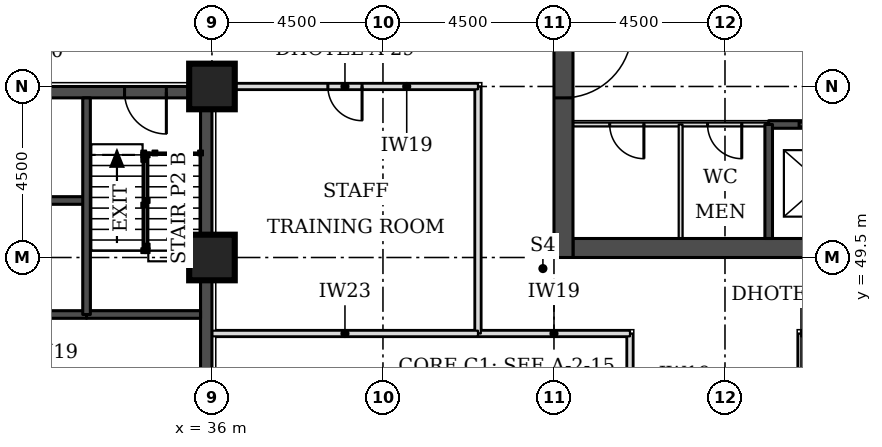
"""IFC4 building model, lengths in metres.
Left out: names, types, materials, properties, quantities, classifications, styles, units other than length and angle.
Written with IfcOpenShell. Run it as: python <this file> out.ifc"""

import sys

from ifc_helpers import new_model, si_unit, direction, frame, frame_2d, origin, origin_2d, place, context, subcontext, project, spatial, rectangle, extrude, element, fill, save


model = new_model("IFC4")
c1 = context("Model", 3, precision=1e-05, world=origin(), true_north=direction((0.0, 1.0)))
c2 = subcontext(c1, "Body", "Model", "MODEL_VIEW")
j1 = project(units=[si_unit("LENGTHUNIT", "METRE"), si_unit("PLANEANGLEUNIT", "RADIAN")], contexts=[c1])
p1 = place(None, origin())
s1 = spatial("IfcSite", under=j1, at=p1, CompositionType="ELEMENT")
p2 = place(p1, origin())
s2 = spatial("IfcBuilding", under=s1, at=p2, CompositionType="ELEMENT")
p3 = place(p2, frame((0.0, 0.0, 49.5)))
s3 = spatial("IfcBuildingStorey", under=s2, at=p3, CompositionType="ELEMENT", Elevation=49.5)
for number, where, z_axis, x_axis in (
    (1, (36.0, 49.5, 0.0), (0.0, 0.0, 1.0), (1.0, 0.0, 0.0)),
    (2, (36.0, 54.0, 0.0), (0.0, 0.0, 1.0), (1.0, 0.0, 0.0)),
):
    element("IfcColumn", number, at=place(p3, frame(where, z_axis=z_axis, x_axis=x_axis)), inside=s3, PredefinedType="COLUMN", context=c2, shape_type="SweptSolid", body=[
        extrude(rectangle(XDim=1.2, YDim=1.2, at=origin_2d()), origin(), (0.0, 0.0, 1.0), 3.3),
    ])
p4 = place(p3, frame((45.5, 49.75, 0.0), z_axis=(0.0, 0.0, 1.0), x_axis=(1.0, 0.0, 0.0)))
e3 = element("IfcWall", 3, at=p4, inside=s3, PredefinedType="SHEAR", context=c2, shape_type="SweptSolid", body=[
    extrude(rectangle(XDim=21.5, YDim=0.5, at=frame_2d((10.75, 0.0))), origin(), (0.0, 0.0, 1.0), 3.3),
])
p5 = place(p3, frame((45.25, 49.5, 0.0), z_axis=(0.0, 0.0, 1.0), x_axis=(0.0, 1.0, 0.0)))
e4 = element("IfcWall", 4, at=p5, inside=s3, PredefinedType="SHEAR", context=c2, shape_type="SweptSolid", body=[
    extrude(rectangle(XDim=22.5, YDim=0.5, at=frame_2d((11.25, 0.0))), origin(), (0.0, 0.0, 1.0), 3.3),
])
p6 = place(p5, frame((4.2, 0.0, 0.0)))
e5 = element("IfcOpeningElement", 5, at=p6, cuts=e4, PredefinedType="OPENING", context=c2, shape_type="SweptSolid", body=[
    extrude(rectangle(XDim=1.8, YDim=2.1, at=frame_2d((0.9, 1.05))), frame((0.0, 0.26, 0.0), z_axis=(0.0, -1.0, 0.0), x_axis=(1.0, 0.0, 0.0)), (0.0, 0.0, 1.0), 0.52),
])
p7 = place(p5, frame((6.9, 0.0, 0.0)))
e6 = element("IfcOpeningElement", 6, at=p7, cuts=e4, PredefinedType="OPENING", context=c2, shape_type="SweptSolid", body=[
    extrude(rectangle(XDim=1.1, YDim=2.1, at=frame_2d((0.55, 1.05))), frame((0.0, 0.26, 0.0), z_axis=(0.0, -1.0, 0.0), x_axis=(1.0, 0.0, 0.0)), (0.0, 0.0, 1.0), 0.52),
])
p8 = place(p5, frame((13.6, 0.0, 0.0)))
e7 = element("IfcOpeningElement", 7, at=p8, cuts=e4, PredefinedType="OPENING", context=c2, shape_type="SweptSolid", body=[
    extrude(rectangle(XDim=1.1, YDim=2.1, at=frame_2d((0.55, 1.05))), frame((0.0, 0.26, 0.0), z_axis=(0.0, -1.0, 0.0), x_axis=(1.0, 0.0, 0.0)), (0.0, 0.0, 1.0), 0.52),
])
p9 = place(p5, frame((16.5, 0.0, 0.0)))
e8 = element("IfcOpeningElement", 8, at=p9, cuts=e4, PredefinedType="OPENING", context=c2, shape_type="SweptSolid", body=[
    extrude(rectangle(XDim=1.8, YDim=2.1, at=frame_2d((0.9, 1.05))), frame((0.0, 0.26, 0.0), z_axis=(0.0, -1.0, 0.0), x_axis=(1.0, 0.0, 0.0)), (0.0, 0.0, 1.0), 0.52),
])
p10 = place(p3, frame((27.3, 53.85, 0.0), z_axis=(0.0, 0.0, 1.0), x_axis=(1.0, 0.0, 0.0)))
e9 = element("IfcWall", 9, at=p10, inside=s3, PredefinedType="SHEAR", context=c2, shape_type="SweptSolid", body=[
    extrude(rectangle(XDim=8.4, YDim=0.3, at=frame_2d((4.2, 0.0))), origin(), (0.0, 0.0, 1.0), 3.3),
])
p11 = place(p10, frame((6.4, 0.0, 0.0)))
e10 = element("IfcOpeningElement", 10, at=p11, cuts=e9, PredefinedType="OPENING", context=c2, shape_type="SweptSolid", body=[
    extrude(rectangle(XDim=1.1, YDim=2.1, at=frame_2d((0.55, 1.05))), frame((0.0, 0.16, 0.0), z_axis=(0.0, -1.0, 0.0), x_axis=(1.0, 0.0, 0.0)), (0.0, 0.0, 1.0), 0.32),
])
p12 = place(p3, frame((35.85, 45.0, 0.0), z_axis=(0.0, 0.0, 1.0), x_axis=(0.0, 1.0, 0.0)))
e11 = element("IfcWall", 11, at=p12, inside=s3, PredefinedType="SHEAR", context=c2, shape_type="SweptSolid", body=[
    extrude(rectangle(XDim=9.0, YDim=0.3, at=frame_2d((4.5, 0.0))), origin(), (0.0, 0.0, 1.0), 3.3),
])
p13 = place(p3, frame((51.5, 23.65, 0.0), z_axis=(0.0, 0.0, 1.0), x_axis=(0.0, 1.0, 0.0)))
e12 = element("IfcWall", 12, at=p13, inside=s3, PredefinedType="PARTITIONING", context=c2, shape_type="SweptSolid", body=[
    extrude(rectangle(XDim=23.85, YDim=0.15, at=frame_2d((11.925, 0.0))), origin(), (0.0, 0.0, 1.0), 3.08),
])
p14 = place(p13, frame((4.075, 0.0, 0.0)))
e13 = element("IfcOpeningElement", 13, at=p14, cuts=e12, PredefinedType="OPENING", context=c2, shape_type="SweptSolid", body=[
    extrude(rectangle(XDim=1.0, YDim=2.1, at=frame_2d((0.5, 1.05))), frame((0.0, 0.085, 0.0), z_axis=(0.0, -1.0, 0.0), x_axis=(1.0, 0.0, 0.0)), (0.0, 0.0, 1.0), 0.17),
])
p15 = place(p13, frame((10.375, 0.0, 0.0)))
e14 = element("IfcOpeningElement", 14, at=p15, cuts=e12, PredefinedType="OPENING", context=c2, shape_type="SweptSolid", body=[
    extrude(rectangle(XDim=1.0, YDim=2.1, at=frame_2d((0.5, 1.05))), frame((0.0, 0.085, 0.0), z_axis=(0.0, -1.0, 0.0), x_axis=(1.0, 0.0, 0.0)), (0.0, 0.0, 1.0), 0.17),
])
p16 = place(p13, frame((19.9, 0.0, 0.0)))
e15 = element("IfcOpeningElement", 15, at=p16, cuts=e12, PredefinedType="OPENING", context=c2, shape_type="SweptSolid", body=[
    extrude(rectangle(XDim=0.9, YDim=2.1, at=frame_2d((0.45, 1.05))), frame((0.0, 0.085, 0.0), z_axis=(0.0, -1.0, 0.0), x_axis=(1.0, 0.0, 0.0)), (0.0, 0.0, 1.0), 0.17),
])
p17 = place(p3, frame((47.0, 40.5, 0.0), z_axis=(0.0, 0.0, 1.0), x_axis=(0.0, 1.0, 0.0)))
e16 = element("IfcWall", 16, at=p17, inside=s3, PredefinedType="PARTITIONING", context=c2, shape_type="SweptSolid", body=[
    extrude(rectangle(XDim=7.0, YDim=0.15, at=frame_2d((3.5, 0.0))), origin(), (0.0, 0.0, 1.0), 3.08),
])
p18 = place(p17, frame((3.05, 0.0, 0.0)))
e17 = element("IfcOpeningElement", 17, at=p18, cuts=e16, PredefinedType="OPENING", context=c2, shape_type="SweptSolid", body=[
    extrude(rectangle(XDim=0.9, YDim=2.1, at=frame_2d((0.45, 1.05))), frame((0.0, 0.085, 0.0), z_axis=(0.0, -1.0, 0.0), x_axis=(1.0, 0.0, 0.0)), (0.0, 0.0, 1.0), 0.17),
])
p19 = place(p3, frame((43.0, 47.5, 0.0), z_axis=(0.0, 0.0, 1.0), x_axis=(1.0, 0.0, 0.0)))
e18 = element("IfcWall", 18, at=p19, inside=s3, PredefinedType="PARTITIONING", context=c2, shape_type="SweptSolid", body=[
    extrude(rectangle(XDim=4.0, YDim=0.15, at=frame_2d((2.0, 0.0))), origin(), (0.0, 0.0, 1.0), 3.08),
])
p20 = place(p3, frame((43.0, 47.5, 0.0), z_axis=(0.0, 0.0, 1.0), x_axis=(0.0, 1.0, 0.0)))
e19 = element("IfcWall", 19, at=p20, inside=s3, PredefinedType="PARTITIONING", context=c2, shape_type="SweptSolid", body=[
    extrude(rectangle(XDim=6.5, YDim=0.15, at=frame_2d((3.25, 0.0))), origin(), (0.0, 0.0, 1.0), 3.08),
])
p21 = place(p3, frame((51.5, 47.5, 0.0), z_axis=(0.0, 0.0, 1.0), x_axis=(1.0, 0.0, 0.0)))
e20 = element("IfcWall", 20, at=p21, inside=s3, PredefinedType="PARTITIONING", context=c2, shape_type="SweptSolid", body=[
    extrude(rectangle(XDim=18.0, YDim=0.15, at=frame_2d((9.0, 0.0))), origin(), (0.0, 0.0, 1.0), 3.08),
])
p22 = place(p21, frame((12.075, 0.0, 0.0)))
e21 = element("IfcOpeningElement", 21, at=p22, cuts=e20, PredefinedType="OPENING", context=c2, shape_type="SweptSolid", body=[
    extrude(rectangle(XDim=1.0, YDim=2.1, at=frame_2d((0.5, 1.05))), frame((0.0, 0.085, 0.0), z_axis=(0.0, -1.0, 0.0), x_axis=(1.0, 0.0, 0.0)), (0.0, 0.0, 1.0), 0.17),
])
p23 = place(p21, frame((9.675, 0.0, 0.0)))
e22 = element("IfcOpeningElement", 22, at=p23, cuts=e20, PredefinedType="OPENING", context=c2, shape_type="SweptSolid", body=[
    extrude(rectangle(XDim=1.0, YDim=2.1, at=frame_2d((0.5, 1.05))), frame((0.0, 0.085, 0.0), z_axis=(0.0, -1.0, 0.0), x_axis=(1.0, 0.0, 0.0)), (0.0, 0.0, 1.0), 0.17),
])
p24 = place(p21, frame((16.5, 0.0, 0.0)))
e23 = element("IfcOpeningElement", 23, at=p24, cuts=e20, PredefinedType="OPENING", context=c2, shape_type="SweptSolid", body=[
    extrude(rectangle(XDim=1.0, YDim=2.1, at=frame_2d((0.5, 1.05))), frame((0.0, 0.085, 0.0), z_axis=(0.0, -1.0, 0.0), x_axis=(1.0, 0.0, 0.0)), (0.0, 0.0, 1.0), 0.17),
])
p25 = place(p3, frame((36.05, 54.0, 0.0), z_axis=(0.0, 0.0, 1.0), x_axis=(1.0, 0.0, 0.0)))
e24 = element("IfcWall", 24, at=p25, inside=s3, PredefinedType="PARTITIONING", context=c2, shape_type="SweptSolid", body=[
    extrude(rectangle(XDim=6.95, YDim=0.15, at=frame_2d((3.475, 0.0))), origin(), (0.0, 0.0, 1.0), 3.08),
])
p26 = place(p25, frame((3.0, 0.0, 0.0)))
e25 = element("IfcOpeningElement", 25, at=p26, cuts=e24, PredefinedType="OPENING", context=c2, shape_type="SweptSolid", body=[
    extrude(rectangle(XDim=0.9, YDim=2.1, at=frame_2d((0.45, 1.05))), frame((0.0, 0.085, 0.0), z_axis=(0.0, -1.0, 0.0), x_axis=(1.0, 0.0, 0.0)), (0.0, 0.0, 1.0), 0.17),
])
p27 = place(p3, frame((36.0, 47.5, 0.0), z_axis=(0.0, 0.0, 1.0), x_axis=(1.0, 0.0, 0.0)))
e26 = element("IfcWall", 26, at=p27, inside=s3, PredefinedType="PARTITIONING", context=c2, shape_type="SweptSolid", body=[
    extrude(rectangle(XDim=7.0, YDim=0.15, at=frame_2d((3.5, 0.0))), origin(), (0.0, 0.0, 1.0), 3.08),
])
p28 = place(p3, frame((45.5, 53.0, 0.0), z_axis=(0.0, 0.0, 1.0), x_axis=(1.0, 0.0, 0.0)))
e27 = element("IfcWall", 27, at=p28, inside=s3, PredefinedType="PARTITIONING", context=c2, shape_type="SweptSolid", body=[
    extrude(rectangle(XDim=5.15, YDim=0.1, at=frame_2d((2.575, 0.0))), origin(), (0.0, 0.0, 1.0), 3.08),
])
p29 = place(p28, frame((0.966, 0.0, 0.0)))
e28 = element("IfcOpeningElement", 28, at=p29, cuts=e27, PredefinedType="OPENING", context=c2, shape_type="SweptSolid", body=[
    extrude(rectangle(XDim=0.9, YDim=2.1, at=frame_2d((0.45, 1.05))), frame((0.0, 0.06, 0.0), z_axis=(0.0, -1.0, 0.0), x_axis=(1.0, 0.0, 0.0)), (0.0, 0.0, 1.0), 0.12),
])
p30 = place(p28, frame((3.541, 0.0, 0.0)))
e29 = element("IfcOpeningElement", 29, at=p30, cuts=e27, PredefinedType="OPENING", context=c2, shape_type="SweptSolid", body=[
    extrude(rectangle(XDim=0.9, YDim=2.1, at=frame_2d((0.45, 1.05))), frame((0.0, 0.06, 0.0), z_axis=(0.0, -1.0, 0.0), x_axis=(1.0, 0.0, 0.0)), (0.0, 0.0, 1.0), 0.12),
])
p31 = place(p3, frame((50.65, 53.0, 0.0), z_axis=(0.0, 0.0, 1.0), x_axis=(1.0, 0.0, 0.0)))
e30 = element("IfcWall", 30, at=p31, inside=s3, PredefinedType="SOLIDWALL", context=c2, shape_type="SweptSolid", body=[
    extrude(rectangle(XDim=11.2, YDim=0.2, at=frame_2d((5.6, 0.0))), origin(), (0.0, 0.0, 1.0), 3.08),
])
p32 = place(p31, frame((0.8, 0.0, 0.0)))
e31 = element("IfcOpeningElement", 31, at=p32, cuts=e30, PredefinedType="OPENING", context=c2, shape_type="SweptSolid", body=[
    extrude(rectangle(XDim=1.2, YDim=2.1, at=frame_2d((0.6, 1.05))), frame((0.0, 0.11, 0.0), z_axis=(0.0, -1.0, 0.0), x_axis=(1.0, 0.0, 0.0)), (0.0, 0.0, 1.0), 0.22),
])
p33 = place(p31, frame((3.6, 0.0, 0.0)))
e32 = element("IfcOpeningElement", 32, at=p33, cuts=e30, PredefinedType="OPENING", context=c2, shape_type="SweptSolid", body=[
    extrude(rectangle(XDim=1.2, YDim=2.1, at=frame_2d((0.6, 1.05))), frame((0.0, 0.11, 0.0), z_axis=(0.0, -1.0, 0.0), x_axis=(1.0, 0.0, 0.0)), (0.0, 0.0, 1.0), 0.22),
])
p34 = place(p31, frame((6.4, 0.0, 0.0)))
e33 = element("IfcOpeningElement", 33, at=p34, cuts=e30, PredefinedType="OPENING", context=c2, shape_type="SweptSolid", body=[
    extrude(rectangle(XDim=1.2, YDim=2.1, at=frame_2d((0.6, 1.05))), frame((0.0, 0.11, 0.0), z_axis=(0.0, -1.0, 0.0), x_axis=(1.0, 0.0, 0.0)), (0.0, 0.0, 1.0), 0.22),
])
p35 = place(p31, frame((9.2, 0.0, 0.0)))
e34 = element("IfcOpeningElement", 34, at=p35, cuts=e30, PredefinedType="OPENING", context=c2, shape_type="SweptSolid", body=[
    extrude(rectangle(XDim=1.2, YDim=2.1, at=frame_2d((0.6, 1.05))), frame((0.0, 0.11, 0.0), z_axis=(0.0, -1.0, 0.0), x_axis=(1.0, 0.0, 0.0)), (0.0, 0.0, 1.0), 0.22),
])
p36 = place(p3, frame((48.333, 50.0, 0.0), z_axis=(0.0, 0.0, 1.0), x_axis=(0.0, 1.0, 0.0)))
e35 = element("IfcWall", 35, at=p36, inside=s3, PredefinedType="PARTITIONING", context=c2, shape_type="SweptSolid", body=[
    extrude(rectangle(XDim=3.0, YDim=0.1, at=frame_2d((1.5, 0.0))), origin(), (0.0, 0.0, 1.0), 3.08),
])
p37 = place(p3, frame((50.65, 50.0, 0.0), z_axis=(0.0, 0.0, 1.0), x_axis=(0.0, 1.0, 0.0)))
e36 = element("IfcWall", 36, at=p37, inside=s3, PredefinedType="SOLIDWALL", context=c2, shape_type="SweptSolid", body=[
    extrude(rectangle(XDim=3.0, YDim=0.2, at=frame_2d((1.5, 0.0))), origin(), (0.0, 0.0, 1.0), 3.08),
])
p38 = place(p3, frame((30.3, 48.0, 0.0), z_axis=(0.0, 0.0, 1.0), x_axis=(1.0, 0.0, 0.0)))
e37 = element("IfcWall", 37, at=p38, inside=s3, PredefinedType="SOLIDWALL", context=c2, shape_type="SweptSolid", body=[
    extrude(rectangle(XDim=2.4, YDim=0.2, at=frame_2d((1.2, 0.0))), origin(), (0.0, 0.0, 1.0), 3.08),
])
p39 = place(p3, frame((32.7, 48.0, 0.0), z_axis=(0.0, 0.0, 1.0), x_axis=(1.0, 0.0, 0.0)))
e38 = element("IfcWall", 38, at=p39, inside=s3, PredefinedType="SOLIDWALL", context=c2, shape_type="SweptSolid", body=[
    extrude(rectangle(XDim=3.0, YDim=0.2, at=frame_2d((1.5, 0.0))), origin(), (0.0, 0.0, 1.0), 3.08),
])
p40 = place(p3, frame((30.3, 51.0, 0.0), z_axis=(0.0, 0.0, 1.0), x_axis=(1.0, 0.0, 0.0)))
e39 = element("IfcWall", 39, at=p40, inside=s3, PredefinedType="SOLIDWALL", context=c2, shape_type="SweptSolid", body=[
    extrude(rectangle(XDim=2.4, YDim=0.2, at=frame_2d((1.2, 0.0))), origin(), (0.0, 0.0, 1.0), 3.3),
])
p41 = place(p3, frame((32.7, 48.0, 0.0), z_axis=(0.0, 0.0, 1.0), x_axis=(0.0, 1.0, 0.0)))
e40 = element("IfcWall", 40, at=p41, inside=s3, PredefinedType="SOLIDWALL", context=c2, shape_type="SweptSolid", body=[
    extrude(rectangle(XDim=5.7, YDim=0.2, at=frame_2d((2.85, 0.0))), origin(), (0.0, 0.0, 1.0), 3.08),
])
p42 = place(p26, frame((0.9, 0.0, 0.0), z_axis=(0.0, 0.0, 1.0), x_axis=(-1.0, 0.0, 0.0)))
e41 = element("IfcDoor", 41, at=p42, inside=s3, OperationType="SINGLE_SWING_LEFT", PredefinedType="DOOR", context=c2, shape_type="SweptSolid", body=[
    extrude(rectangle(XDim=0.9, YDim=2.1, at=frame_2d((0.45, 1.05))), frame((0.0, 0.025, 0.0), z_axis=(0.0, -1.0, 0.0), x_axis=(1.0, 0.0, 0.0)), (0.0, 0.0, 1.0), 0.05),
])
fill(e25, e41)
p43 = place(p32, origin())
e42 = element("IfcDoor", 42, at=p43, inside=s3, OperationType="DOUBLE_DOOR_SLIDING", PredefinedType="DOOR", context=c2, shape_type="SweptSolid", body=[
    extrude(rectangle(XDim=1.2, YDim=2.1, at=frame_2d((0.6, 1.05))), frame((0.0, 0.025, 0.0), z_axis=(0.0, -1.0, 0.0), x_axis=(1.0, 0.0, 0.0)), (0.0, 0.0, 1.0), 0.05),
])
fill(e31, e42)
p44 = place(p6, frame((1.8, 0.0, 0.0), z_axis=(0.0, 0.0, 1.0), x_axis=(-1.0, 0.0, 0.0)))
e43 = element("IfcDoor", 43, at=p44, inside=s3, OperationType="SINGLE_SWING_LEFT", PredefinedType="DOOR", context=c2, shape_type="SweptSolid", body=[
    extrude(rectangle(XDim=1.8, YDim=2.1, at=frame_2d((0.9, 1.05))), frame((0.0, 0.025, 0.0), z_axis=(0.0, -1.0, 0.0), x_axis=(1.0, 0.0, 0.0)), (0.0, 0.0, 1.0), 0.05),
])
fill(e5, e43)
p45 = place(p29, frame((0.9, 0.0, 0.0), z_axis=(0.0, 0.0, 1.0), x_axis=(-1.0, 0.0, 0.0)))
e44 = element("IfcDoor", 44, at=p45, inside=s3, OperationType="SINGLE_SWING_LEFT", PredefinedType="DOOR", context=c2, shape_type="SweptSolid", body=[
    extrude(rectangle(XDim=0.9, YDim=2.1, at=frame_2d((0.45, 1.05))), frame((0.0, 0.025, 0.0), z_axis=(0.0, -1.0, 0.0), x_axis=(1.0, 0.0, 0.0)), (0.0, 0.0, 1.0), 0.05),
])
fill(e28, e44)
p46 = place(p30, frame((0.9, 0.0, 0.0), z_axis=(0.0, 0.0, 1.0), x_axis=(-1.0, 0.0, 0.0)))
e45 = element("IfcDoor", 45, at=p46, inside=s3, OperationType="SINGLE_SWING_LEFT", PredefinedType="DOOR", context=c2, shape_type="SweptSolid", body=[
    extrude(rectangle(XDim=0.9, YDim=2.1, at=frame_2d((0.45, 1.05))), frame((0.0, 0.025, 0.0), z_axis=(0.0, -1.0, 0.0), x_axis=(1.0, 0.0, 0.0)), (0.0, 0.0, 1.0), 0.05),
])
fill(e29, e45)
p47 = place(p11, frame((1.1, 0.0, 0.0), z_axis=(0.0, 0.0, 1.0), x_axis=(-1.0, 0.0, 0.0)))
e46 = element("IfcDoor", 46, at=p47, inside=s3, OperationType="SINGLE_SWING_LEFT", PredefinedType="DOOR", context=c2, shape_type="SweptSolid", body=[
    extrude(rectangle(XDim=1.1, YDim=2.1, at=frame_2d((0.55, 1.05))), frame((0.0, 0.025, 0.0), z_axis=(0.0, -1.0, 0.0), x_axis=(1.0, 0.0, 0.0)), (0.0, 0.0, 1.0), 0.05),
])
fill(e10, e46)
save(model, sys.argv[1])
